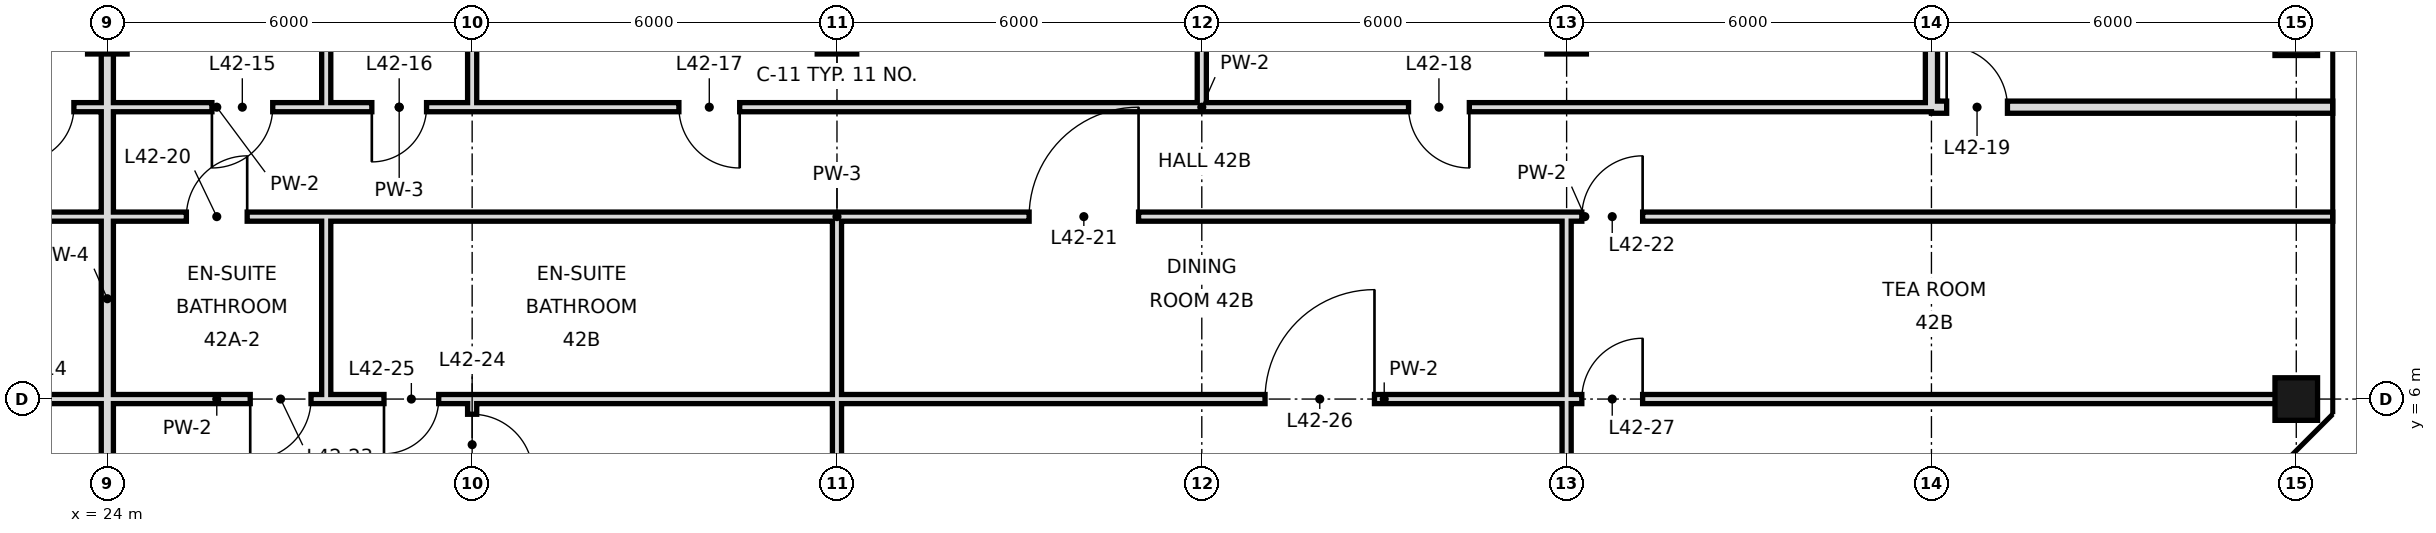
"""IFC4 building model, lengths in metres.
Left out: names, types, materials, properties, quantities, classifications, styles, units other than length and angle.
Written with IfcOpenShell. Run it as: python <this file> out.ifc"""

import sys

from ifc_helpers import new_model, si_unit, direction, frame, frame_2d, origin, origin_2d, place, context, subcontext, project, spatial, rectangle, hollow_rectangle, extrude, element, fill, save


model = new_model("IFC4")
c1 = context("Model", 3, precision=1e-05, world=origin(), true_north=direction((0.0, 1.0)))
c2 = subcontext(c1, "Body", "Model", "MODEL_VIEW")
j1 = project(units=[si_unit("LENGTHUNIT", "METRE"), si_unit("PLANEANGLEUNIT", "RADIAN")], contexts=[c1])
p1 = place(None, origin())
s1 = spatial("IfcSite", under=j1, at=p1, CompositionType="ELEMENT")
p2 = place(p1, origin())
s2 = spatial("IfcBuilding", under=s1, at=p2, CompositionType="ELEMENT")
p3 = place(p2, frame((0.0, 0.0, 181.6)))
s3 = spatial("IfcBuildingStorey", under=s2, at=p3, CompositionType="ELEMENT", Elevation=181.6)
for number, where, z_axis, x_axis in (
    (1, (24.0, 12.0, 0.0), (0.0, 0.0, 1.0), (1.0, 0.0, 0.0)),
    (2, (36.0, 12.0, 0.0), (0.0, 0.0, 1.0), (1.0, 0.0, 0.0)),
    (3, (48.0, 12.0, 0.0), (0.0, 0.0, 1.0), (1.0, 0.0, 0.0)),
):
    element("IfcColumn", number, at=place(p3, frame(where, z_axis=z_axis, x_axis=x_axis)), inside=s3, PredefinedType="COLUMN", context=c2, shape_type="SweptSolid", body=[
        extrude(hollow_rectangle(XDim=0.65, YDim=0.65, WallThickness=0.032, at=origin_2d()), origin(), (0.0, 0.0, 1.0), 4.4),
    ])
for number, where, z_axis, x_axis in (
    (4, (60.0, 6.0, 0.0), (0.0, 0.0, 1.0), (1.0, 0.0, 0.0)),
    (5, (60.0, 12.0, 0.0), (0.0, 0.0, 1.0), (1.0, 0.0, 0.0)),
):
    element("IfcColumn", number, at=place(p3, frame(where, z_axis=z_axis, x_axis=x_axis)), inside=s3, PredefinedType="COLUMN", context=c2, shape_type="SweptSolid", body=[
        extrude(hollow_rectangle(XDim=0.7, YDim=0.7, WallThickness=0.036, at=origin_2d()), origin(), (0.0, 0.0, 1.0), 4.4),
    ])
p4 = place(p3, frame((24.0, 0.0, 0.0), z_axis=(0.0, 0.0, 1.0), x_axis=(0.0, 1.0, 0.0)))
e6 = element("IfcWall", 6, at=p4, inside=s3, PredefinedType="SOLIDWALL", context=c2, shape_type="SweptSolid", body=[
    extrude(rectangle(XDim=15.3, YDim=0.2, at=frame_2d((7.65, 0.0))), origin(), (0.0, 0.0, 1.0), 3.4),
])
p5 = place(p3, frame((27.6, 6.0, 0.0), z_axis=(0.0, 0.0, 1.0), x_axis=(0.0, 1.0, 0.0)))
e7 = element("IfcWall", 7, at=p5, inside=s3, PredefinedType="PARTITIONING", context=c2, shape_type="SweptSolid", body=[
    extrude(rectangle(XDim=3.0, YDim=0.15, at=frame_2d((1.5, 0.0))), origin(), (0.0, 0.0, 1.0), 4.1),
])
p6 = place(p3, frame((27.6, 10.8, 0.0), z_axis=(0.0, 0.0, 1.0), x_axis=(0.0, 1.0, 0.0)))
e8 = element("IfcWall", 8, at=p6, inside=s3, PredefinedType="PARTITIONING", context=c2, shape_type="SweptSolid", body=[
    extrude(rectangle(XDim=4.5, YDim=0.15, at=frame_2d((2.25, 0.0))), origin(), (0.0, 0.0, 1.0), 4.1),
])
p7 = place(p3, frame((30.0, -0.6, 0.0), z_axis=(0.0, 0.0, 1.0), x_axis=(0.0, 1.0, 0.0)))
e9 = element("IfcWall", 9, at=p7, inside=s3, PredefinedType="PARTITIONING", context=c2, shape_type="SweptSolid", body=[
    extrude(rectangle(XDim=6.6, YDim=0.15, at=frame_2d((3.3, 0.0))), origin(), (0.0, 0.0, 1.0), 3.4),
])
p8 = place(p7, frame((5.35, 0.0, 0.0)))
e10 = element("IfcOpeningElement", 10, at=p8, cuts=e9, PredefinedType="OPENING", context=c2, shape_type="SweptSolid", body=[
    extrude(rectangle(XDim=1.0, YDim=2.4, at=frame_2d((0.5, 1.2))), frame((0.0, 0.085, 0.0), z_axis=(0.0, -1.0, 0.0), x_axis=(1.0, 0.0, 0.0)), (0.0, 0.0, 1.0), 0.17),
])
p9 = place(p3, frame((30.0, 10.8, 0.0), z_axis=(0.0, 0.0, 1.0), x_axis=(0.0, 1.0, 0.0)))
e11 = element("IfcWall", 11, at=p9, inside=s3, PredefinedType="PARTITIONING", context=c2, shape_type="SweptSolid", body=[
    extrude(rectangle(XDim=4.5, YDim=0.15, at=frame_2d((2.25, 0.0))), origin(), (0.0, 0.0, 1.0), 3.4),
])
p10 = place(p3, frame((36.0, 0.0, 0.0), z_axis=(0.0, 0.0, 1.0), x_axis=(0.0, 1.0, 0.0)))
e12 = element("IfcWall", 12, at=p10, inside=s3, PredefinedType="PARTITIONING", context=c2, shape_type="SweptSolid", body=[
    extrude(rectangle(XDim=6.0, YDim=0.15, at=frame_2d((3.0, 0.0))), origin(), (0.0, 0.0, 1.0), 3.4),
])
p11 = place(p3, frame((36.0, 6.0, 0.0), z_axis=(0.0, 0.0, 1.0), x_axis=(0.0, 1.0, 0.0)))
e13 = element("IfcWall", 13, at=p11, inside=s3, PredefinedType="PARTITIONING", context=c2, shape_type="SweptSolid", body=[
    extrude(rectangle(XDim=3.0, YDim=0.15, at=frame_2d((1.5, 0.0))), origin(), (0.0, 0.0, 1.0), 3.4),
])
p12 = place(p3, frame((42.0, 10.8, 0.0), z_axis=(0.0, 0.0, 1.0), x_axis=(0.0, 1.0, 0.0)))
e14 = element("IfcWall", 14, at=p12, inside=s3, PredefinedType="PARTITIONING", context=c2, shape_type="SweptSolid", body=[
    extrude(rectangle(XDim=4.5, YDim=0.15, at=frame_2d((2.25, 0.0))), origin(), (0.0, 0.0, 1.0), 3.4),
])
p13 = place(p3, frame((48.0, 0.0, 0.0), z_axis=(0.0, 0.0, 1.0), x_axis=(0.0, 1.0, 0.0)))
e15 = element("IfcWall", 15, at=p13, inside=s3, PredefinedType="PARTITIONING", context=c2, shape_type="SweptSolid", body=[
    extrude(rectangle(XDim=9.0, YDim=0.15, at=frame_2d((4.5, 0.0))), origin(), (0.0, 0.0, 1.0), 3.4),
])
p14 = place(p3, frame((54.0, 10.8, 0.0), z_axis=(0.0, 0.0, 1.0), x_axis=(0.0, 1.0, 0.0)))
e16 = element("IfcWall", 16, at=p14, inside=s3, PredefinedType="SOLIDWALL", context=c2, shape_type="SweptSolid", body=[
    extrude(rectangle(XDim=7.2, YDim=0.2, at=frame_2d((3.6, 0.0))), origin(), (0.0, 0.0, 1.0), 3.4),
])
p15 = place(p3, frame((54.0, 10.8, 0.0), z_axis=(0.0, 0.0, 1.0), x_axis=(1.0, 0.0, 0.0)))
e17 = element("IfcWall", 17, at=p15, inside=s3, PredefinedType="SOLIDWALL", context=c2, shape_type="SweptSolid", body=[
    extrude(rectangle(XDim=6.6, YDim=0.2, at=frame_2d((3.3, 0.0))), origin(), (0.0, 0.0, 1.0), 3.65),
])
p16 = place(p15, frame((0.25, 0.0, 0.0)))
e18 = element("IfcOpeningElement", 18, at=p16, cuts=e17, PredefinedType="OPENING", context=c2, shape_type="SweptSolid", body=[
    extrude(rectangle(XDim=1.0, YDim=2.4, at=frame_2d((0.5, 1.2))), frame((0.0, 0.11, 0.0), z_axis=(0.0, -1.0, 0.0), x_axis=(1.0, 0.0, 0.0)), (0.0, 0.0, 1.0), 0.22),
])
p17 = place(p3, frame((24.0, 10.8, 0.0), z_axis=(0.0, 0.0, 1.0), x_axis=(1.0, 0.0, 0.0)))
e19 = element("IfcWall", 19, at=p17, inside=s3, PredefinedType="PARTITIONING", context=c2, shape_type="SweptSolid", body=[
    extrude(rectangle(XDim=3.6, YDim=0.15, at=frame_2d((1.8, 0.0))), origin(), (0.0, 0.0, 1.0), 4.1),
])
p18 = place(p17, frame((1.72, 0.0, 0.0)))
e20 = element("IfcOpeningElement", 20, at=p18, cuts=e19, PredefinedType="OPENING", context=c2, shape_type="SweptSolid", body=[
    extrude(rectangle(XDim=1.0, YDim=2.4, at=frame_2d((0.5, 1.2))), frame((0.0, 0.085, 0.0), z_axis=(0.0, -1.0, 0.0), x_axis=(1.0, 0.0, 0.0)), (0.0, 0.0, 1.0), 0.17),
])
p19 = place(p3, frame((30.0, 10.8, 0.0), z_axis=(0.0, 0.0, 1.0), x_axis=(1.0, 0.0, 0.0)))
e21 = element("IfcWall", 21, at=p19, inside=s3, PredefinedType="PARTITIONING", context=c2, shape_type="SweptSolid", body=[
    extrude(rectangle(XDim=24.0, YDim=0.15, at=frame_2d((12.0, 0.0))), origin(), (0.0, 0.0, 1.0), 4.1),
])
p20 = place(p19, frame((3.4, 0.0, 0.0)))
e22 = element("IfcOpeningElement", 22, at=p20, cuts=e21, PredefinedType="OPENING", context=c2, shape_type="SweptSolid", body=[
    extrude(rectangle(XDim=1.0, YDim=2.4, at=frame_2d((0.5, 1.2))), frame((0.0, 0.085, 0.0), z_axis=(0.0, -1.0, 0.0), x_axis=(1.0, 0.0, 0.0)), (0.0, 0.0, 1.0), 0.17),
])
p21 = place(p19, frame((15.4, 0.0, 0.0)))
e23 = element("IfcOpeningElement", 23, at=p21, cuts=e21, PredefinedType="OPENING", context=c2, shape_type="SweptSolid", body=[
    extrude(rectangle(XDim=1.0, YDim=2.4, at=frame_2d((0.5, 1.2))), frame((0.0, 0.085, 0.0), z_axis=(0.0, -1.0, 0.0), x_axis=(1.0, 0.0, 0.0)), (0.0, 0.0, 1.0), 0.17),
])
p22 = place(p3, frame((21.6, 10.8, 0.0), z_axis=(0.0, 0.0, 1.0), x_axis=(1.0, 0.0, 0.0)))
e24 = element("IfcWall", 24, at=p22, inside=s3, PredefinedType="PARTITIONING", context=c2, shape_type="SweptSolid", body=[
    extrude(rectangle(XDim=2.4, YDim=0.15, at=frame_2d((1.2, 0.0))), origin(), (0.0, 0.0, 1.0), 4.1),
])
p23 = place(p22, frame((0.95, 0.0, 0.0)))
e25 = element("IfcOpeningElement", 25, at=p23, cuts=e24, PredefinedType="OPENING", context=c2, shape_type="SweptSolid", body=[
    extrude(rectangle(XDim=0.9, YDim=2.4, at=frame_2d((0.45, 1.2))), frame((0.0, 0.085, 0.0), z_axis=(0.0, -1.0, 0.0), x_axis=(1.0, 0.0, 0.0)), (0.0, 0.0, 1.0), 0.17),
])
p24 = place(p3, frame((27.6, 10.8, 0.0), z_axis=(0.0, 0.0, 1.0), x_axis=(1.0, 0.0, 0.0)))
e26 = element("IfcWall", 26, at=p24, inside=s3, PredefinedType="PARTITIONING", context=c2, shape_type="SweptSolid", body=[
    extrude(rectangle(XDim=2.4, YDim=0.15, at=frame_2d((1.2, 0.0))), origin(), (0.0, 0.0, 1.0), 4.1),
])
p25 = place(p24, frame((0.75, 0.0, 0.0)))
e27 = element("IfcOpeningElement", 27, at=p25, cuts=e26, PredefinedType="OPENING", context=c2, shape_type="SweptSolid", body=[
    extrude(rectangle(XDim=0.9, YDim=2.4, at=frame_2d((0.45, 1.2))), frame((0.0, 0.085, 0.0), z_axis=(0.0, -1.0, 0.0), x_axis=(1.0, 0.0, 0.0)), (0.0, 0.0, 1.0), 0.17),
])
p26 = place(p3, frame((24.0, 6.0, 0.0), z_axis=(0.0, 0.0, 1.0), x_axis=(1.0, 0.0, 0.0)))
e28 = element("IfcWall", 28, at=p26, inside=s3, PredefinedType="PARTITIONING", context=c2, shape_type="SweptSolid", body=[
    extrude(rectangle(XDim=3.6, YDim=0.15, at=frame_2d((1.8, 0.0))), origin(), (0.0, 0.0, 1.0), 3.65),
])
p27 = place(p26, frame((2.35, 0.0, 0.0)))
e29 = element("IfcOpeningElement", 29, at=p27, cuts=e28, PredefinedType="OPENING", context=c2, shape_type="SweptSolid", body=[
    extrude(rectangle(XDim=1.0, YDim=2.4, at=frame_2d((0.5, 1.2))), frame((0.0, 0.085, 0.0), z_axis=(0.0, -1.0, 0.0), x_axis=(1.0, 0.0, 0.0)), (0.0, 0.0, 1.0), 0.17),
])
p28 = place(p3, frame((36.0, 6.0, 0.0), z_axis=(0.0, 0.0, 1.0), x_axis=(1.0, 0.0, 0.0)))
e30 = element("IfcWall", 30, at=p28, inside=s3, PredefinedType="PARTITIONING", context=c2, shape_type="SweptSolid", body=[
    extrude(rectangle(XDim=24.0, YDim=0.15, at=frame_2d((12.0, 0.0))), origin(), (0.0, 0.0, 1.0), 3.4),
])
p29 = place(p28, frame((7.04, 0.0, 0.0)))
e31 = element("IfcOpeningElement", 31, at=p29, cuts=e30, PredefinedType="OPENING", context=c2, shape_type="SweptSolid", body=[
    extrude(rectangle(XDim=1.8, YDim=2.4, at=frame_2d((0.9, 1.2))), frame((0.0, 0.085, 0.0), z_axis=(0.0, -1.0, 0.0), x_axis=(1.0, 0.0, 0.0)), (0.0, 0.0, 1.0), 0.17),
])
p30 = place(p28, frame((12.25, 0.0, 0.0)))
e32 = element("IfcOpeningElement", 32, at=p30, cuts=e30, PredefinedType="OPENING", context=c2, shape_type="SweptSolid", body=[
    extrude(rectangle(XDim=1.0, YDim=2.4, at=frame_2d((0.5, 1.2))), frame((0.0, 0.085, 0.0), z_axis=(0.0, -1.0, 0.0), x_axis=(1.0, 0.0, 0.0)), (0.0, 0.0, 1.0), 0.17),
])
p31 = place(p3, frame((21.6, 6.0, 0.0), z_axis=(0.0, 0.0, 1.0), x_axis=(1.0, 0.0, 0.0)))
e33 = element("IfcWall", 33, at=p31, inside=s3, PredefinedType="PARTITIONING", context=c2, shape_type="SweptSolid", body=[
    extrude(rectangle(XDim=2.4, YDim=0.15, at=frame_2d((1.2, 0.0))), origin(), (0.0, 0.0, 1.0), 3.65),
])
p32 = place(p31, frame((0.25, 0.0, 0.0)))
e34 = element("IfcOpeningElement", 34, at=p32, cuts=e33, PredefinedType="OPENING", context=c2, shape_type="SweptSolid", body=[
    extrude(rectangle(XDim=0.9, YDim=2.4, at=frame_2d((0.45, 1.2))), frame((0.0, 0.085, 0.0), z_axis=(0.0, -1.0, 0.0), x_axis=(1.0, 0.0, 0.0)), (0.0, 0.0, 1.0), 0.17),
])
p33 = place(p3, frame((27.6, 6.0, 0.0), z_axis=(0.0, 0.0, 1.0), x_axis=(1.0, 0.0, 0.0)))
e35 = element("IfcWall", 35, at=p33, inside=s3, PredefinedType="PARTITIONING", context=c2, shape_type="SweptSolid", body=[
    extrude(rectangle(XDim=8.4, YDim=0.15, at=frame_2d((4.2, 0.0))), origin(), (0.0, 0.0, 1.0), 3.65),
])
p34 = place(p33, frame((0.95, 0.0, 0.0)))
e36 = element("IfcOpeningElement", 36, at=p34, cuts=e35, PredefinedType="OPENING", context=c2, shape_type="SweptSolid", body=[
    extrude(rectangle(XDim=0.9, YDim=2.4, at=frame_2d((0.45, 1.2))), frame((0.0, 0.085, 0.0), z_axis=(0.0, -1.0, 0.0), x_axis=(1.0, 0.0, 0.0)), (0.0, 0.0, 1.0), 0.17),
])
p35 = place(p3, frame((24.0, 9.0, 0.0), z_axis=(0.0, 0.0, 1.0), x_axis=(1.0, 0.0, 0.0)))
e37 = element("IfcWall", 37, at=p35, inside=s3, PredefinedType="PARTITIONING", context=c2, shape_type="SweptSolid", body=[
    extrude(rectangle(XDim=3.6, YDim=0.15, at=frame_2d((1.8, 0.0))), origin(), (0.0, 0.0, 1.0), 4.1),
])
p36 = place(p35, frame((1.3, 0.0, 0.0)))
e38 = element("IfcOpeningElement", 38, at=p36, cuts=e37, PredefinedType="OPENING", context=c2, shape_type="SweptSolid", body=[
    extrude(rectangle(XDim=1.0, YDim=2.4, at=frame_2d((0.5, 1.2))), frame((0.0, 0.085, 0.0), z_axis=(0.0, -1.0, 0.0), x_axis=(1.0, 0.0, 0.0)), (0.0, 0.0, 1.0), 0.17),
])
p37 = place(p3, frame((36.0, 9.0, 0.0), z_axis=(0.0, 0.0, 1.0), x_axis=(1.0, 0.0, 0.0)))
e39 = element("IfcWall", 39, at=p37, inside=s3, PredefinedType="PARTITIONING", context=c2, shape_type="SweptSolid", body=[
    extrude(rectangle(XDim=24.6, YDim=0.15, at=frame_2d((12.3, 0.0))), origin(), (0.0, 0.0, 1.0), 4.1),
])
p38 = place(p37, frame((3.16, 0.0, 0.0)))
e40 = element("IfcOpeningElement", 40, at=p38, cuts=e39, PredefinedType="OPENING", context=c2, shape_type="SweptSolid", body=[
    extrude(rectangle(XDim=1.8, YDim=2.4, at=frame_2d((0.9, 1.2))), frame((0.0, 0.085, 0.0), z_axis=(0.0, -1.0, 0.0), x_axis=(1.0, 0.0, 0.0)), (0.0, 0.0, 1.0), 0.17),
])
p39 = place(p37, frame((12.25, 0.0, 0.0)))
e41 = element("IfcOpeningElement", 41, at=p39, cuts=e39, PredefinedType="OPENING", context=c2, shape_type="SweptSolid", body=[
    extrude(rectangle(XDim=1.0, YDim=2.4, at=frame_2d((0.5, 1.2))), frame((0.0, 0.085, 0.0), z_axis=(0.0, -1.0, 0.0), x_axis=(1.0, 0.0, 0.0)), (0.0, 0.0, 1.0), 0.17),
])
p40 = place(p3, frame((21.6, 9.0, 0.0), z_axis=(0.0, 0.0, 1.0), x_axis=(1.0, 0.0, 0.0)))
e42 = element("IfcWall", 42, at=p40, inside=s3, PredefinedType="PARTITIONING", context=c2, shape_type="SweptSolid", body=[
    extrude(rectangle(XDim=2.4, YDim=0.15, at=frame_2d((1.2, 0.0))), origin(), (0.0, 0.0, 1.0), 4.1),
])
p41 = place(p3, frame((27.6, 9.0, 0.0), z_axis=(0.0, 0.0, 1.0), x_axis=(1.0, 0.0, 0.0)))
e43 = element("IfcWall", 43, at=p41, inside=s3, PredefinedType="PARTITIONING", context=c2, shape_type="SweptSolid", body=[
    extrude(rectangle(XDim=8.4, YDim=0.15, at=frame_2d((4.2, 0.0))), origin(), (0.0, 0.0, 1.0), 4.1),
])
p42 = place(p23, frame((0.9, 0.0, 0.0), z_axis=(0.0, 0.0, 1.0), x_axis=(-1.0, 0.0, 0.0)))
e44 = element("IfcDoor", 44, at=p42, inside=s3, OperationType="SINGLE_SWING_RIGHT", PredefinedType="DOOR", context=c2, shape_type="SweptSolid", body=[
    extrude(rectangle(XDim=0.9, YDim=2.4, at=frame_2d((0.45, 1.2))), frame((0.0, 0.025, 0.0), z_axis=(0.0, -1.0, 0.0), x_axis=(1.0, 0.0, 0.0)), (0.0, 0.0, 1.0), 0.05),
])
fill(e25, e44)
p43 = place(p18, frame((1.0, 0.0, 0.0), z_axis=(0.0, 0.0, 1.0), x_axis=(-1.0, 0.0, 0.0)))
e45 = element("IfcDoor", 45, at=p43, inside=s3, OperationType="SINGLE_SWING_RIGHT", PredefinedType="DOOR", context=c2, shape_type="SweptSolid", body=[
    extrude(rectangle(XDim=1.0, YDim=2.4, at=frame_2d((0.5, 1.2))), frame((0.0, 0.025, 0.0), z_axis=(0.0, -1.0, 0.0), x_axis=(1.0, 0.0, 0.0)), (0.0, 0.0, 1.0), 0.05),
])
fill(e20, e45)
p44 = place(p25, frame((0.9, 0.0, 0.0), z_axis=(0.0, 0.0, 1.0), x_axis=(-1.0, 0.0, 0.0)))
e46 = element("IfcDoor", 46, at=p44, inside=s3, OperationType="SINGLE_SWING_RIGHT", PredefinedType="DOOR", context=c2, shape_type="SweptSolid", body=[
    extrude(rectangle(XDim=0.9, YDim=2.4, at=frame_2d((0.45, 1.2))), frame((0.0, 0.025, 0.0), z_axis=(0.0, -1.0, 0.0), x_axis=(1.0, 0.0, 0.0)), (0.0, 0.0, 1.0), 0.05),
])
fill(e27, e46)
p45 = place(p20, origin())
e47 = element("IfcDoor", 47, at=p45, inside=s3, OperationType="SINGLE_SWING_RIGHT", PredefinedType="DOOR", context=c2, shape_type="SweptSolid", body=[
    extrude(rectangle(XDim=1.0, YDim=2.4, at=frame_2d((0.5, 1.2))), frame((0.0, 0.025, 0.0), z_axis=(0.0, -1.0, 0.0), x_axis=(1.0, 0.0, 0.0)), (0.0, 0.0, 1.0), 0.05),
])
fill(e22, e47)
p46 = place(p21, origin())
e48 = element("IfcDoor", 48, at=p46, inside=s3, OperationType="SINGLE_SWING_RIGHT", PredefinedType="DOOR", context=c2, shape_type="SweptSolid", body=[
    extrude(rectangle(XDim=1.0, YDim=2.4, at=frame_2d((0.5, 1.2))), frame((0.0, 0.025, 0.0), z_axis=(0.0, -1.0, 0.0), x_axis=(1.0, 0.0, 0.0)), (0.0, 0.0, 1.0), 0.05),
])
fill(e23, e48)
p47 = place(p16, origin())
e49 = element("IfcDoor", 49, at=p47, inside=s3, OperationType="SINGLE_SWING_LEFT", PredefinedType="DOOR", context=c2, shape_type="SweptSolid", body=[
    extrude(rectangle(XDim=1.0, YDim=2.4, at=frame_2d((0.5, 1.2))), frame((0.0, 0.025, 0.0), z_axis=(0.0, -1.0, 0.0), x_axis=(1.0, 0.0, 0.0)), (0.0, 0.0, 1.0), 0.05),
])
fill(e18, e49)
p48 = place(p36, frame((1.0, 0.0, 0.0), z_axis=(0.0, 0.0, 1.0), x_axis=(-1.0, 0.0, 0.0)))
e50 = element("IfcDoor", 50, at=p48, inside=s3, OperationType="SINGLE_SWING_LEFT", PredefinedType="DOOR", context=c2, shape_type="SweptSolid", body=[
    extrude(rectangle(XDim=1.0, YDim=2.4, at=frame_2d((0.5, 1.2))), frame((0.0, 0.025, 0.0), z_axis=(0.0, -1.0, 0.0), x_axis=(1.0, 0.0, 0.0)), (0.0, 0.0, 1.0), 0.05),
])
fill(e38, e50)
p49 = place(p38, frame((1.8, 0.0, 0.0), z_axis=(0.0, 0.0, 1.0), x_axis=(-1.0, 0.0, 0.0)))
e51 = element("IfcDoor", 51, at=p49, inside=s3, OperationType="SINGLE_SWING_LEFT", PredefinedType="DOOR", context=c2, shape_type="SweptSolid", body=[
    extrude(rectangle(XDim=1.8, YDim=2.4, at=frame_2d((0.9, 1.2))), frame((0.0, 0.025, 0.0), z_axis=(0.0, -1.0, 0.0), x_axis=(1.0, 0.0, 0.0)), (0.0, 0.0, 1.0), 0.05),
])
fill(e40, e51)
p50 = place(p39, frame((1.0, 0.0, 0.0), z_axis=(0.0, 0.0, 1.0), x_axis=(-1.0, 0.0, 0.0)))
e52 = element("IfcDoor", 52, at=p50, inside=s3, OperationType="SINGLE_SWING_LEFT", PredefinedType="DOOR", context=c2, shape_type="SweptSolid", body=[
    extrude(rectangle(XDim=1.0, YDim=2.4, at=frame_2d((0.5, 1.2))), frame((0.0, 0.025, 0.0), z_axis=(0.0, -1.0, 0.0), x_axis=(1.0, 0.0, 0.0)), (0.0, 0.0, 1.0), 0.05),
])
fill(e41, e52)
p51 = place(p27, frame((1.0, 0.0, 0.0), z_axis=(0.0, 0.0, 1.0), x_axis=(-1.0, 0.0, 0.0)))
e53 = element("IfcDoor", 53, at=p51, inside=s3, OperationType="SINGLE_SWING_RIGHT", PredefinedType="DOOR", context=c2, shape_type="SweptSolid", body=[
    extrude(rectangle(XDim=1.0, YDim=2.4, at=frame_2d((0.5, 1.2))), frame((0.0, 0.025, 0.0), z_axis=(0.0, -1.0, 0.0), x_axis=(1.0, 0.0, 0.0)), (0.0, 0.0, 1.0), 0.05),
])
fill(e29, e53)
p52 = place(p8, frame((1.0, 0.0, 0.0), z_axis=(0.0, 0.0, 1.0), x_axis=(-1.0, 0.0, 0.0)))
e54 = element("IfcDoor", 54, at=p52, inside=s3, OperationType="SINGLE_SWING_RIGHT", PredefinedType="DOOR", context=c2, shape_type="SweptSolid", body=[
    extrude(rectangle(XDim=1.0, YDim=2.4, at=frame_2d((0.5, 1.2))), frame((0.0, 0.025, 0.0), z_axis=(0.0, -1.0, 0.0), x_axis=(1.0, 0.0, 0.0)), (0.0, 0.0, 1.0), 0.05),
])
fill(e10, e54)
p53 = place(p34, frame((0.9, 0.0, 0.0), z_axis=(0.0, 0.0, 1.0), x_axis=(-1.0, 0.0, 0.0)))
e55 = element("IfcDoor", 55, at=p53, inside=s3, OperationType="SINGLE_SWING_RIGHT", PredefinedType="DOOR", context=c2, shape_type="SweptSolid", body=[
    extrude(rectangle(XDim=0.9, YDim=2.4, at=frame_2d((0.45, 1.2))), frame((0.0, 0.025, 0.0), z_axis=(0.0, -1.0, 0.0), x_axis=(1.0, 0.0, 0.0)), (0.0, 0.0, 1.0), 0.05),
])
fill(e36, e55)
p54 = place(p29, frame((1.8, 0.0, 0.0), z_axis=(0.0, 0.0, 1.0), x_axis=(-1.0, 0.0, 0.0)))
e56 = element("IfcDoor", 56, at=p54, inside=s3, OperationType="SINGLE_SWING_LEFT", PredefinedType="DOOR", context=c2, shape_type="SweptSolid", body=[
    extrude(rectangle(XDim=1.8, YDim=2.4, at=frame_2d((0.9, 1.2))), frame((0.0, 0.025, 0.0), z_axis=(0.0, -1.0, 0.0), x_axis=(1.0, 0.0, 0.0)), (0.0, 0.0, 1.0), 0.05),
])
fill(e31, e56)
p55 = place(p30, frame((1.0, 0.0, 0.0), z_axis=(0.0, 0.0, 1.0), x_axis=(-1.0, 0.0, 0.0)))
e57 = element("IfcDoor", 57, at=p55, inside=s3, OperationType="SINGLE_SWING_LEFT", PredefinedType="DOOR", context=c2, shape_type="SweptSolid", body=[
    extrude(rectangle(XDim=1.0, YDim=2.4, at=frame_2d((0.5, 1.2))), frame((0.0, 0.025, 0.0), z_axis=(0.0, -1.0, 0.0), x_axis=(1.0, 0.0, 0.0)), (0.0, 0.0, 1.0), 0.05),
])
fill(e32, e57)
save(model, sys.argv[1])
